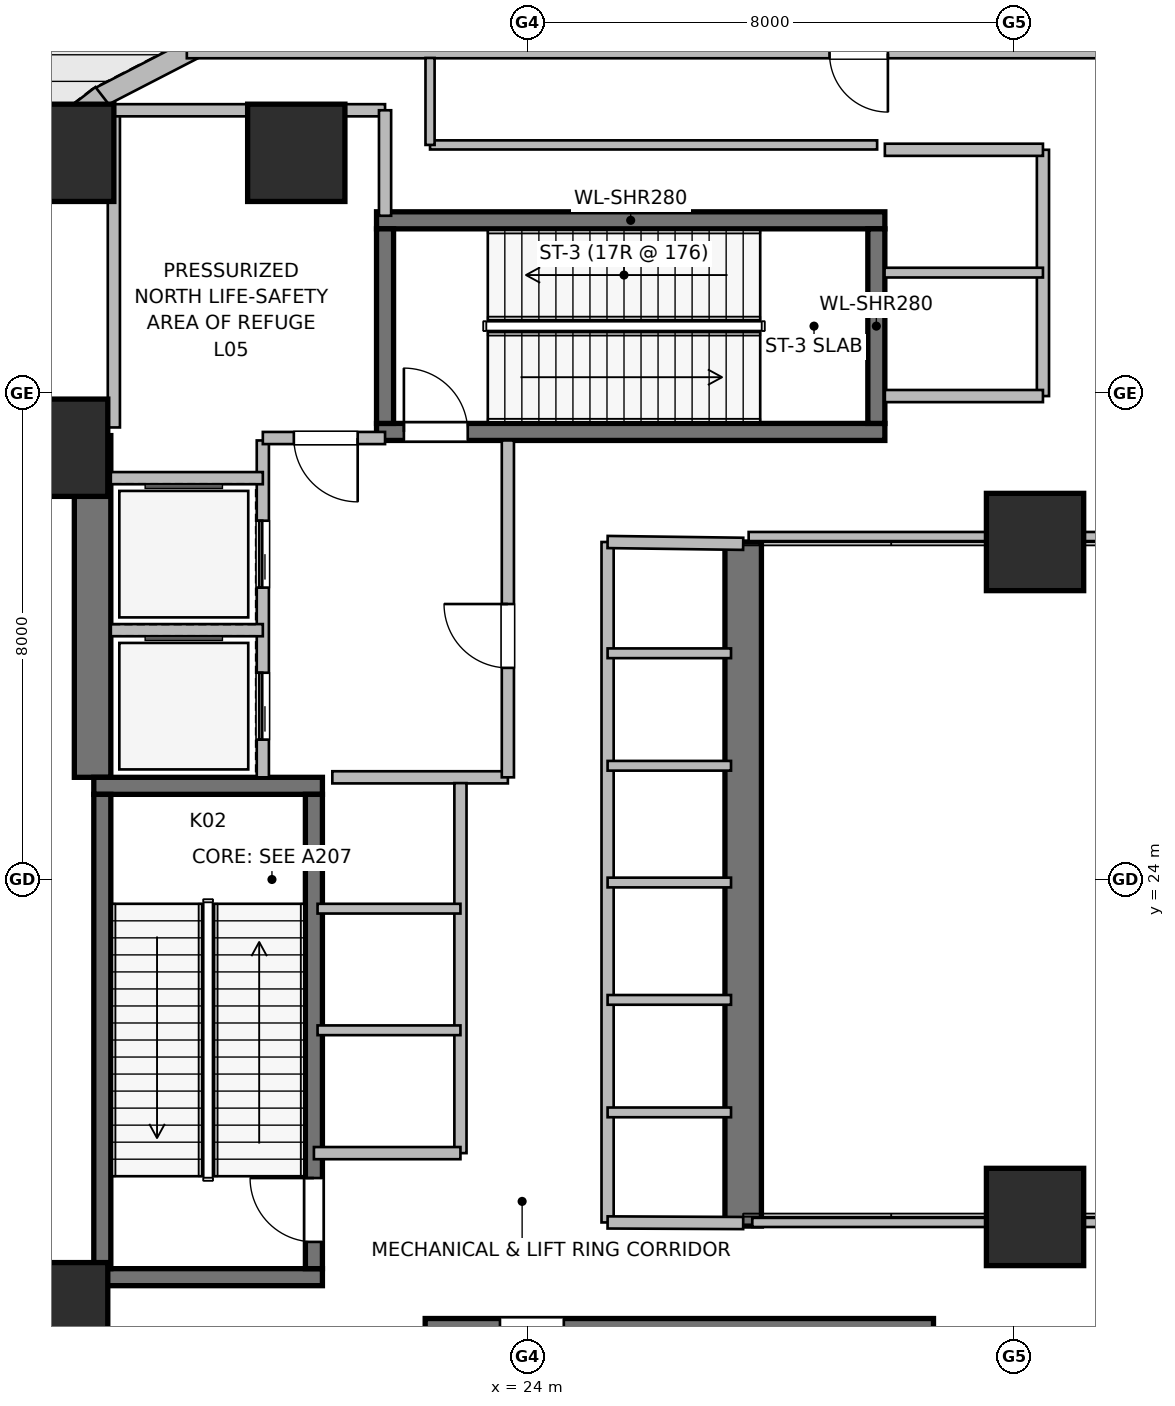
"""IFC4 building model, lengths in metres.
Left out: names, types, materials, properties, quantities, classifications, styles, units other than length and angle.
Written with IfcOpenShell. Run it as: python <this file> out.ifc"""

import sys

from ifc_helpers import new_model, si_unit, direction, frame, frame_2d, origin, origin_2d, place, context, subcontext, project, spatial, rectangle, extrude, element, fill, save


model = new_model("IFC4")
c1 = context("Model", 3, precision=1e-05, world=origin(), true_north=direction((0.0, 1.0)))
c2 = subcontext(c1, "Body", "Model", "MODEL_VIEW")
j1 = project(units=[si_unit("LENGTHUNIT", "METRE"), si_unit("PLANEANGLEUNIT", "RADIAN")], contexts=[c1])
p1 = place(None, origin())
s1 = spatial("IfcSite", under=j1, at=p1, CompositionType="ELEMENT")
p2 = place(p1, origin())
s2 = spatial("IfcBuilding", under=s1, at=p2, CompositionType="ELEMENT")
p3 = place(p2, frame((0.0, 0.0, 21.0)))
s3 = spatial("IfcBuildingStorey", under=s2, at=p3, CompositionType="ELEMENT", Elevation=21.0)
p4 = place(p3, frame((16.85, 25.68, 0.0), z_axis=(0.0, 0.0, 1.0), x_axis=(0.0, 1.0, 0.0)))
e1 = element("IfcWall", 1, at=p4, inside=s3, PredefinedType="SHEAR", context=c2, shape_type="SweptSolid", body=[
    extrude(rectangle(XDim=5.62, YDim=0.6, at=frame_2d((2.81, 0.0))), origin(), (0.0, 0.0, 1.0), 6.0),
])
p5 = place(p3, frame((27.55, 29.55, 0.0), z_axis=(0.0, 0.0, 1.0), x_axis=(0.0, -1.0, 0.0)))
e2 = element("IfcWall", 2, at=p5, inside=s3, PredefinedType="SHEAR", context=c2, shape_type="SweptSolid", body=[
    extrude(rectangle(XDim=11.25, YDim=0.6, at=frame_2d((5.625, 0.0))), origin(), (0.0, 0.0, 1.0), 6.0),
])
for number, where, z_axis, x_axis in (
    (3, (16.87, 17.46, 0.0), (0.0, 0.0, 1.0), (1.0, 0.0, 0.0)),
    (4, (20.63, 25.54, 0.0), (0.0, 0.0, 1.0), (-1.0, 0.0, 0.0)),
):
    element("IfcWall", number, at=place(p3, frame(where, z_axis=z_axis, x_axis=x_axis)), inside=s3, PredefinedType="SHEAR", context=c2, shape_type="SweptSolid", body=[
        extrude(rectangle(XDim=3.76, YDim=0.28, at=frame_2d((1.88, 0.0))), origin(), (0.0, 0.0, 1.0), 6.0),
    ])
p6 = place(p3, frame((17.01, 25.4, 0.0), z_axis=(0.0, 0.0, 1.0), x_axis=(0.0, -1.0, 0.0)))
e5 = element("IfcWall", 5, at=p6, inside=s3, PredefinedType="SHEAR", context=c2, shape_type="SweptSolid", body=[
    extrude(rectangle(XDim=7.8, YDim=0.28, at=frame_2d((3.9, 0.0))), origin(), (0.0, 0.0, 1.0), 6.0),
])
p7 = place(p3, frame((20.49, 17.6, 0.0), z_axis=(0.0, 0.0, 1.0), x_axis=(0.0, 1.0, 0.0)))
e6 = element("IfcWall", 6, at=p7, inside=s3, PredefinedType="SHEAR", context=c2, shape_type="SweptSolid", body=[
    extrude(rectangle(XDim=7.8, YDim=0.28, at=frame_2d((3.9, 0.0))), origin(), (0.0, 0.0, 1.0), 6.0),
])
p8 = place(p7, frame((0.44, 0.0, 0.0)))
e7 = element("IfcOpeningElement", 7, at=p8, cuts=e6, PredefinedType="OPENING", context=c2, shape_type="SweptSolid", body=[
    extrude(rectangle(XDim=1.05, YDim=2.0, at=frame_2d((0.525, 1.0))), frame((0.0, 0.15, 0.0), z_axis=(0.0, -1.0, 0.0), x_axis=(1.0, 0.0, 0.0)), (0.0, 0.0, 1.0), 0.3),
])
p9 = place(p3, frame((30.68, 16.64, 0.0), z_axis=(0.0, 0.0, 1.0), x_axis=(-1.0, 0.0, 0.0)))
e8 = element("IfcWall", 8, at=p9, inside=s3, PredefinedType="SHEAR", context=c2, shape_type="SweptSolid", body=[
    extrude(rectangle(XDim=8.36, YDim=0.28, at=frame_2d((4.18, 0.0))), origin(), (0.0, 0.0, 1.0), 6.0),
])
p10 = place(p9, frame((6.08, 0.0, 0.0)))
e9 = element("IfcOpeningElement", 9, at=p10, cuts=e8, PredefinedType="OPENING", context=c2, shape_type="SweptSolid", body=[
    extrude(rectangle(XDim=1.05, YDim=2.0, at=frame_2d((0.525, 1.0))), frame((0.0, 0.15, 0.0), z_axis=(0.0, -1.0, 0.0), x_axis=(1.0, 0.0, 0.0)), (0.0, 0.0, 1.0), 0.3),
])
p11 = place(p3, frame((21.52, 31.36, 0.0), z_axis=(0.0, 0.0, 1.0), x_axis=(1.0, 0.0, 0.0)))
e10 = element("IfcWall", 10, at=p11, inside=s3, PredefinedType="SHEAR", context=c2, shape_type="SweptSolid", body=[
    extrude(rectangle(XDim=8.36, YDim=0.28, at=frame_2d((4.18, 0.0))), origin(), (0.0, 0.0, 1.0), 6.0),
])
p12 = place(p11, frame((0.45, 0.0, 0.0)))
e11 = element("IfcOpeningElement", 11, at=p12, cuts=e10, PredefinedType="OPENING", context=c2, shape_type="SweptSolid", body=[
    extrude(rectangle(XDim=1.05, YDim=2.0, at=frame_2d((0.525, 1.0))), frame((0.0, 0.15, 0.0), z_axis=(0.0, -1.0, 0.0), x_axis=(1.0, 0.0, 0.0)), (0.0, 0.0, 1.0), 0.3),
])
p13 = place(p3, frame((29.88, 34.84, 0.0), z_axis=(0.0, 0.0, 1.0), x_axis=(-1.0, 0.0, 0.0)))
e12 = element("IfcWall", 12, at=p13, inside=s3, PredefinedType="SHEAR", context=c2, shape_type="SweptSolid", body=[
    extrude(rectangle(XDim=8.36, YDim=0.28, at=frame_2d((4.18, 0.0))), origin(), (0.0, 0.0, 1.0), 6.0),
])
for number, where, z_axis, x_axis in (
    (13, (21.66, 34.7, 0.0), (0.0, 0.0, 1.0), (0.0, -1.0, 0.0)),
    (14, (29.74, 31.5, 0.0), (0.0, 0.0, 1.0), (0.0, 1.0, 0.0)),
):
    element("IfcWall", number, at=place(p3, frame(where, z_axis=z_axis, x_axis=x_axis)), inside=s3, PredefinedType="SHEAR", context=c2, shape_type="SweptSolid", body=[
        extrude(rectangle(XDim=3.2, YDim=0.28, at=frame_2d((1.6, 0.0))), origin(), (0.0, 0.0, 1.0), 6.0),
    ])
for number, where, z_axis, x_axis in (
    (15, (16.3, 16.9, 0.0), (0.0, 0.0, 1.0), (1.0, 0.0, 0.0)),
    (16, (16.3, 31.1, 0.0), (0.0, 0.0, 1.0), (1.0, 0.0, 0.0)),
    (17, (32.35, 18.45, 0.0), (0.0, 0.0, 1.0), (1.0, 0.0, 0.0)),
    (18, (32.35, 29.55, 0.0), (0.0, 0.0, 1.0), (1.0, 0.0, 0.0)),
):
    element("IfcColumn", number, at=place(p3, frame(where, z_axis=z_axis, x_axis=x_axis)), inside=s3, PredefinedType="COLUMN", context=c2, shape_type="SweptSolid", body=[
        extrude(rectangle(XDim=1.6, YDim=1.6, at=origin_2d()), origin(), (0.0, 0.0, 1.0), 6.0),
    ])
for number, where, z_axis, x_axis in (
    (19, (20.2, 35.95, 0.0), (0.0, 0.0, 1.0), (1.0, 0.0, 0.0)),
    (20, (16.4, 35.95, 0.0), (0.0, 0.0, 1.0), (1.0, 0.0, 0.0)),
):
    element("IfcColumn", number, at=place(p3, frame(where, z_axis=z_axis, x_axis=x_axis)), inside=s3, PredefinedType="COLUMN", context=c2, shape_type="SweptSolid", body=[
        extrude(rectangle(XDim=1.6, YDim=1.6, at=origin_2d()), origin(), (0.0, 0.0, 1.0), 5.5),
    ])
p14 = place(p3, frame((16.924, 36.841, 0.0), z_axis=(0.0, 0.0, 1.0), x_axis=(0.888634413993, 0.458616264721, 0.0)))
e21 = element("IfcWall", 21, at=p14, inside=s3, PredefinedType="STANDARD", context=c2, shape_type="SweptSolid", body=[
    extrude(rectangle(XDim=20.531, YDim=0.34, at=frame_2d((10.266, 0.0))), origin(), (0.0, 0.0, 1.0), 3.6),
])
p15 = place(p3, frame((15.673, 35.875, 0.0), z_axis=(0.0, 0.0, 1.0), x_axis=(0.790691856293, 0.61221433207, 0.0)))
e22 = element("IfcWall", 22, at=p15, inside=s3, PredefinedType="STANDARD", context=c2, shape_type="SweptSolid", body=[
    extrude(rectangle(XDim=1.676, YDim=0.33, at=frame_2d((0.838, 0.0))), origin(), (0.0, 0.0, 1.0), 3.6),
])
p16 = place(p3, frame((19.65, 25.68, 0.0), z_axis=(0.0, 0.0, 1.0), x_axis=(0.0, 1.0, 0.0)))
e23 = element("IfcWall", 23, at=p16, inside=s3, PredefinedType="PARTITIONING", context=c2, shape_type="SweptSolid", body=[
    extrude(rectangle(XDim=5.54, YDim=0.2, at=frame_2d((2.77, 0.0))), origin(), (0.0, 0.0, 1.0), 5.58),
])
p17 = place(p16, frame((0.62, 0.0, 0.0)))
e24 = element("IfcOpeningElement", 24, at=p17, cuts=e23, PredefinedType="OPENING", context=c2, shape_type="SweptSolid", body=[
    extrude(rectangle(XDim=1.1, YDim=2.2, at=frame_2d((0.55, 1.1))), frame((0.0, 0.11, 0.0), z_axis=(0.0, -1.0, 0.0), x_axis=(1.0, 0.0, 0.0)), (0.0, 0.0, 1.0), 0.22),
])
p18 = place(p16, frame((3.12, 0.0, 0.0)))
e25 = element("IfcOpeningElement", 25, at=p18, cuts=e23, PredefinedType="OPENING", context=c2, shape_type="SweptSolid", body=[
    extrude(rectangle(XDim=1.1, YDim=2.2, at=frame_2d((0.55, 1.1))), frame((0.0, 0.11, 0.0), z_axis=(0.0, -1.0, 0.0), x_axis=(1.0, 0.0, 0.0)), (0.0, 0.0, 1.0), 0.22),
])
p19 = place(p3, frame((20.793, 25.68, 0.0), z_axis=(0.0, 0.0, 1.0), x_axis=(1.0, 0.0, 0.0)))
e26 = element("IfcWall", 26, at=p19, inside=s3, PredefinedType="PARTITIONING", context=c2, shape_type="SweptSolid", body=[
    extrude(rectangle(XDim=2.887, YDim=0.2, at=frame_2d((1.443, 0.0))), origin(), (0.0, 0.0, 1.0), 5.58),
])
p20 = place(p3, frame((23.68, 25.68, 0.0), z_axis=(0.0, 0.0, 1.0), x_axis=(0.0, 1.0, 0.0)))
e27 = element("IfcWall", 27, at=p20, inside=s3, PredefinedType="PARTITIONING", context=c2, shape_type="SweptSolid", body=[
    extrude(rectangle(XDim=5.54, YDim=0.2, at=frame_2d((2.77, 0.0))), origin(), (0.0, 0.0, 1.0), 5.58),
])
p21 = place(p20, frame((1.8, 0.0, 0.0)))
e28 = element("IfcOpeningElement", 28, at=p21, cuts=e27, PredefinedType="OPENING", context=c2, shape_type="SweptSolid", body=[
    extrude(rectangle(XDim=1.05, YDim=2.0, at=frame_2d((0.525, 1.0))), frame((0.0, 0.11, 0.0), z_axis=(0.0, -1.0, 0.0), x_axis=(1.0, 0.0, 0.0)), (0.0, 0.0, 1.0), 0.22),
])
p22 = place(p3, frame((21.66, 31.26, 0.0), z_axis=(0.0, 0.0, 1.0), x_axis=(-1.0, 0.0, 0.0)))
e29 = element("IfcWall", 29, at=p22, inside=s3, PredefinedType="PARTITIONING", context=c2, shape_type="SweptSolid", body=[
    extrude(rectangle(XDim=2.01, YDim=0.2, at=frame_2d((1.005, 0.0))), origin(), (0.0, 0.0, 1.0), 5.58),
])
p23 = place(p22, frame((0.45, 0.0, 0.0)))
e30 = element("IfcOpeningElement", 30, at=p23, cuts=e29, PredefinedType="OPENING", context=c2, shape_type="SweptSolid", body=[
    extrude(rectangle(XDim=1.05, YDim=2.0, at=frame_2d((0.525, 1.0))), frame((0.0, 0.11, 0.0), z_axis=(0.0, -1.0, 0.0), x_axis=(1.0, 0.0, 0.0)), (0.0, 0.0, 1.0), 0.22),
])
p24 = place(p3, frame((17.15, 28.1, 0.0), z_axis=(0.0, 0.0, 1.0), x_axis=(1.0, 0.0, 0.0)))
e31 = element("IfcWall", 31, at=p24, inside=s3, PredefinedType="PARTITIONING", context=c2, shape_type="SweptSolid", body=[
    extrude(rectangle(XDim=2.5, YDim=0.2, at=frame_2d((1.25, 0.0))), origin(), (0.0, 0.0, 1.0), 5.58),
])
p25 = place(p3, frame((19.65, 30.6, 0.0), z_axis=(0.0, 0.0, 1.0), x_axis=(-1.0, 0.0, 0.0)))
e32 = element("IfcWall", 32, at=p25, inside=s3, PredefinedType="PARTITIONING", context=c2, shape_type="SweptSolid", body=[
    extrude(rectangle(XDim=2.5, YDim=0.2, at=frame_2d((1.25, 0.0))), origin(), (0.0, 0.0, 1.0), 4.48),
])
p26 = place(p3, frame((32.48, 31.95, 0.0), z_axis=(0.0, 0.0, 1.0), x_axis=(0.0, 1.0, 0.0)))
e33 = element("IfcWall", 33, at=p26, inside=s3, PredefinedType="PARTITIONING", context=c2, shape_type="SweptSolid", body=[
    extrude(rectangle(XDim=4.05, YDim=0.2, at=frame_2d((2.025, 0.0))), origin(), (0.0, 0.0, 1.0), 5.58),
])
for number, where, z_axis, x_axis in (
    (34, (29.88, 36.0, 0.0), (0.0, 0.0, 1.0), (1.0, 0.0, 0.0)),
    (35, (32.48, 31.95, 0.0), (0.0, 0.0, 1.0), (-1.0, 0.0, 0.0)),
):
    element("IfcWall", number, at=place(p3, frame(where, z_axis=z_axis, x_axis=x_axis)), inside=s3, PredefinedType="PARTITIONING", context=c2, shape_type="SweptSolid", body=[
        extrude(rectangle(XDim=2.6, YDim=0.2, at=frame_2d((1.3, 0.0))), origin(), (0.0, 0.0, 1.0), 5.58),
    ])
p27 = place(p3, frame((29.875, 33.98, 0.0), z_axis=(0.0, 0.0, 1.0), x_axis=(1.0, 0.0, 0.0)))
e36 = element("IfcWall", 36, at=p27, inside=s3, PredefinedType="PARTITIONING", context=c2, shape_type="SweptSolid", body=[
    extrude(rectangle(XDim=2.605, YDim=0.16, at=frame_2d((1.302, 0.0))), origin(), (0.0, 0.0, 1.0), 5.58),
])
p28 = place(p3, frame((22.9, 19.5, 0.0), z_axis=(0.0, 0.0, 1.0), x_axis=(0.0, 1.0, 0.0)))
e37 = element("IfcWall", 37, at=p28, inside=s3, PredefinedType="PARTITIONING", context=c2, shape_type="SweptSolid", body=[
    extrude(rectangle(XDim=6.085, YDim=0.2, at=frame_2d((3.042, 0.0))), origin(), (0.0, 0.0, 1.0), 5.58),
])
p29 = place(p3, frame((20.49, 19.5, 0.0), z_axis=(0.0, 0.0, 1.0), x_axis=(1.0, 0.0, 0.0)))
e38 = element("IfcWall", 38, at=p29, inside=s3, PredefinedType="PARTITIONING", context=c2, shape_type="SweptSolid", body=[
    extrude(rectangle(XDim=2.41, YDim=0.2, at=frame_2d((1.205, 0.0))), origin(), (0.0, 0.0, 1.0), 4.48),
])
for number, where, z_axis, x_axis in (
    (39, (20.55, 21.52, 0.0), (0.0, 0.0, 1.0), (1.0, 0.0, 0.0)),
    (40, (20.55, 23.52, 0.0), (0.0, 0.0, 1.0), (1.0, 0.0, 0.0)),
):
    element("IfcWall", number, at=place(p3, frame(where, z_axis=z_axis, x_axis=x_axis)), inside=s3, PredefinedType="PARTITIONING", context=c2, shape_type="SweptSolid", body=[
        extrude(rectangle(XDim=2.35, YDim=0.16, at=frame_2d((1.175, 0.0))), origin(), (0.0, 0.0, 1.0), 5.58),
    ])
p30 = place(p3, frame((25.32, 29.55, 0.0), z_axis=(0.0, 0.0, 1.0), x_axis=(0.0, -1.0, 0.0)))
e41 = element("IfcWall", 41, at=p30, inside=s3, PredefinedType="PARTITIONING", context=c2, shape_type="SweptSolid", body=[
    extrude(rectangle(XDim=11.19, YDim=0.2, at=frame_2d((5.595, 0.0))), origin(), (0.0, 0.0, 1.0), 5.58),
])
p31 = place(p3, frame((25.32, 18.36, 0.0), z_axis=(0.0, 0.0, 1.0), x_axis=(0.999989925833, -0.004488678231, 0.0)))
e42 = element("IfcWall", 42, at=p31, inside=s3, PredefinedType="PARTITIONING", context=c2, shape_type="SweptSolid", body=[
    extrude(rectangle(XDim=2.23, YDim=0.2, at=frame_2d((1.115, 0.0))), origin(), (0.0, 0.0, 1.0), 5.58),
])
p32 = place(p3, frame((27.55, 29.52, 0.0), z_axis=(0.0, 0.0, 1.0), x_axis=(-0.999909343457, 0.013464949556, 0.0)))
e43 = element("IfcWall", 43, at=p32, inside=s3, PredefinedType="PARTITIONING", context=c2, shape_type="SweptSolid", body=[
    extrude(rectangle(XDim=2.23, YDim=0.2, at=frame_2d((1.115, 0.0))), origin(), (0.0, 0.0, 1.0), 4.48),
])
for number, where, z_axis, x_axis in (
    (44, (25.32, 20.17, 0.0), (0.0, 0.0, 1.0), (1.0, 0.0, 0.0)),
    (45, (25.32, 22.02, 0.0), (0.0, 0.0, 1.0), (1.0, 0.0, 0.0)),
    (46, (25.32, 23.95, 0.0), (0.0, 0.0, 1.0), (1.0, 0.0, 0.0)),
    (47, (25.32, 25.87, 0.0), (0.0, 0.0, 1.0), (1.0, 0.0, 0.0)),
    (48, (25.32, 27.72, 0.0), (0.0, 0.0, 1.0), (1.0, 0.0, 0.0)),
):
    element("IfcWall", number, at=place(p3, frame(where, z_axis=z_axis, x_axis=x_axis)), inside=s3, PredefinedType="PARTITIONING", context=c2, shape_type="SweptSolid", body=[
        extrude(rectangle(XDim=2.03, YDim=0.16, at=frame_2d((1.015, 0.0))), origin(), (0.0, 0.0, 1.0), 5.58),
    ])
p33 = place(p3, frame((17.2, 36.65, 0.0), z_axis=(0.0, 0.0, 1.0), x_axis=(0.0, -1.0, 0.0)))
e49 = element("IfcWall", 49, at=p33, inside=s3, PredefinedType="PARTITIONING", context=c2, shape_type="SweptSolid", body=[
    extrude(rectangle(XDim=5.216, YDim=0.2, at=frame_2d((2.608, 0.0))), origin(), (0.0, 0.0, 1.0), 3.6),
])
p34 = place(p3, frame((21.66, 36.65, 0.0), z_axis=(0.0, 0.0, 1.0), x_axis=(-1.0, 0.0, 0.0)))
e50 = element("IfcWall", 50, at=p34, inside=s3, PredefinedType="PARTITIONING", context=c2, shape_type="SweptSolid", body=[
    extrude(rectangle(XDim=4.46, YDim=0.2, at=frame_2d((2.23, 0.0))), origin(), (0.0, 0.0, 1.0), 5.58),
])
p35 = place(p3, frame((21.66, 34.915, 0.0), z_axis=(0.0, 0.0, 1.0), x_axis=(0.0, 1.0, 0.0)))
e51 = element("IfcWall", 51, at=p35, inside=s3, PredefinedType="PARTITIONING", context=c2, shape_type="SweptSolid", body=[
    extrude(rectangle(XDim=1.735, YDim=0.2, at=frame_2d((0.867, 0.0))), origin(), (0.0, 0.0, 1.0), 5.58),
])
p36 = place(p3, frame((27.7, 18.36, 0.0), z_axis=(0.0, 0.0, 1.0), x_axis=(1.0, 0.0, 0.0)))
e52 = element("IfcWall", 52, at=p36, inside=s3, PredefinedType="PARTITIONING", context=c2, shape_type="SweptSolid", body=[
    extrude(rectangle(XDim=12.14, YDim=0.15, at=frame_2d((6.07, 0.0))), origin(), (0.0, 0.0, 1.0), 3.6),
])
p37 = place(p3, frame((39.84, 29.64, 0.0), z_axis=(0.0, 0.0, 1.0), x_axis=(-1.0, 0.0, 0.0)))
e53 = element("IfcWall", 53, at=p37, inside=s3, PredefinedType="PARTITIONING", context=c2, shape_type="SweptSolid", body=[
    extrude(rectangle(XDim=12.2, YDim=0.15, at=frame_2d((6.1, 0.0))), origin(), (0.0, 0.0, 1.0), 3.6),
])
p38 = place(p3, frame((34.0, 37.58, 0.0), z_axis=(0.0, 0.0, 1.0), x_axis=(-1.0, 0.0, 0.0)))
e54 = element("IfcWall", 54, at=p38, inside=s3, PredefinedType="PARTITIONING", context=c2, shape_type="SweptSolid", body=[
    extrude(rectangle(XDim=15.6, YDim=0.15, at=frame_2d((7.8, 0.0))), origin(), (0.0, 0.0, 1.0), 5.58),
])
p39 = place(p38, frame((4.07, 0.0, 0.0)))
e55 = element("IfcOpeningElement", 55, at=p39, cuts=e54, PredefinedType="OPENING", context=c2, shape_type="SweptSolid", body=[
    extrude(rectangle(XDim=0.96, YDim=2.0, at=frame_2d((0.48, 1.0))), frame((0.0, 0.085, 0.0), z_axis=(0.0, -1.0, 0.0), x_axis=(1.0, 0.0, 0.0)), (0.0, 0.0, 1.0), 0.17),
])
p40 = place(p3, frame((29.753, 36.08, 0.0), z_axis=(0.0, 0.0, 1.0), x_axis=(-1.0, 0.0, 0.0)))
e56 = element("IfcWall", 56, at=p40, inside=s3, PredefinedType="PARTITIONING", context=c2, shape_type="SweptSolid", body=[
    extrude(rectangle(XDim=7.353, YDim=0.15, at=frame_2d((3.677, 0.0))), origin(), (0.0, 0.0, 1.0), 5.58),
])
p41 = place(p3, frame((22.4, 36.08, 0.0), z_axis=(0.0, 0.0, 1.0), x_axis=(0.0, 1.0, 0.0)))
e57 = element("IfcWall", 57, at=p41, inside=s3, PredefinedType="PARTITIONING", context=c2, shape_type="SweptSolid", body=[
    extrude(rectangle(XDim=1.43, YDim=0.15, at=frame_2d((0.715, 0.0))), origin(), (0.0, 0.0, 1.0), 5.58),
])
p42 = place(p8, origin())
e58 = element("IfcDoor", 58, at=p42, inside=s3, OperationType="SINGLE_SWING_RIGHT", PredefinedType="DOOR", context=c2, shape_type="SweptSolid", body=[
    extrude(rectangle(XDim=1.05, YDim=2.0, at=frame_2d((0.525, 1.0))), frame((0.0, 0.025, 0.0), z_axis=(0.0, -1.0, 0.0), x_axis=(1.0, 0.0, 0.0)), (0.0, 0.0, 1.0), 0.05),
])
fill(e7, e58)
p43 = place(p10, origin())
e59 = element("IfcDoor", 59, at=p43, inside=s3, OperationType="SINGLE_SWING_RIGHT", PredefinedType="DOOR", context=c2, shape_type="SweptSolid", body=[
    extrude(rectangle(XDim=1.05, YDim=2.0, at=frame_2d((0.525, 1.0))), frame((0.0, 0.025, 0.0), z_axis=(0.0, -1.0, 0.0), x_axis=(1.0, 0.0, 0.0)), (0.0, 0.0, 1.0), 0.05),
])
fill(e9, e59)
p44 = place(p12, origin())
e60 = element("IfcDoor", 60, at=p44, inside=s3, OperationType="SINGLE_SWING_LEFT", PredefinedType="DOOR", context=c2, shape_type="SweptSolid", body=[
    extrude(rectangle(XDim=1.05, YDim=2.0, at=frame_2d((0.525, 1.0))), frame((0.0, 0.025, 0.0), z_axis=(0.0, -1.0, 0.0), x_axis=(1.0, 0.0, 0.0)), (0.0, 0.0, 1.0), 0.05),
])
fill(e11, e60)
p45 = place(p17, origin())
e61 = element("IfcDoor", 61, at=p45, inside=s3, OperationType="SLIDING_TO_LEFT", PredefinedType="DOOR", context=c2, shape_type="SweptSolid", body=[
    extrude(rectangle(XDim=1.1, YDim=2.2, at=frame_2d((0.55, 1.1))), frame((0.0, 0.025, 0.0), z_axis=(0.0, -1.0, 0.0), x_axis=(1.0, 0.0, 0.0)), (0.0, 0.0, 1.0), 0.05),
])
fill(e24, e61)
p46 = place(p18, origin())
e62 = element("IfcDoor", 62, at=p46, inside=s3, OperationType="SLIDING_TO_LEFT", PredefinedType="DOOR", context=c2, shape_type="SweptSolid", body=[
    extrude(rectangle(XDim=1.1, YDim=2.2, at=frame_2d((0.55, 1.1))), frame((0.0, 0.025, 0.0), z_axis=(0.0, -1.0, 0.0), x_axis=(1.0, 0.0, 0.0)), (0.0, 0.0, 1.0), 0.05),
])
fill(e25, e62)
p47 = place(p21, origin())
e63 = element("IfcDoor", 63, at=p47, inside=s3, OperationType="SINGLE_SWING_RIGHT", PredefinedType="DOOR", context=c2, shape_type="SweptSolid", body=[
    extrude(rectangle(XDim=1.05, YDim=2.0, at=frame_2d((0.525, 1.0))), frame((0.0, 0.025, 0.0), z_axis=(0.0, -1.0, 0.0), x_axis=(1.0, 0.0, 0.0)), (0.0, 0.0, 1.0), 0.05),
])
fill(e28, e63)
p48 = place(p23, origin())
e64 = element("IfcDoor", 64, at=p48, inside=s3, OperationType="SINGLE_SWING_LEFT", PredefinedType="DOOR", context=c2, shape_type="SweptSolid", body=[
    extrude(rectangle(XDim=1.05, YDim=2.0, at=frame_2d((0.525, 1.0))), frame((0.0, 0.025, 0.0), z_axis=(0.0, -1.0, 0.0), x_axis=(1.0, 0.0, 0.0)), (0.0, 0.0, 1.0), 0.05),
])
fill(e30, e64)
p49 = place(p39, origin())
e65 = element("IfcDoor", 65, at=p49, inside=s3, OperationType="SINGLE_SWING_LEFT", PredefinedType="DOOR", context=c2, shape_type="SweptSolid", body=[
    extrude(rectangle(XDim=0.96, YDim=2.0, at=frame_2d((0.48, 1.0))), frame((0.0, 0.025, 0.0), z_axis=(0.0, -1.0, 0.0), x_axis=(1.0, 0.0, 0.0)), (0.0, 0.0, 1.0), 0.05),
])
fill(e55, e65)
save(model, sys.argv[1])
